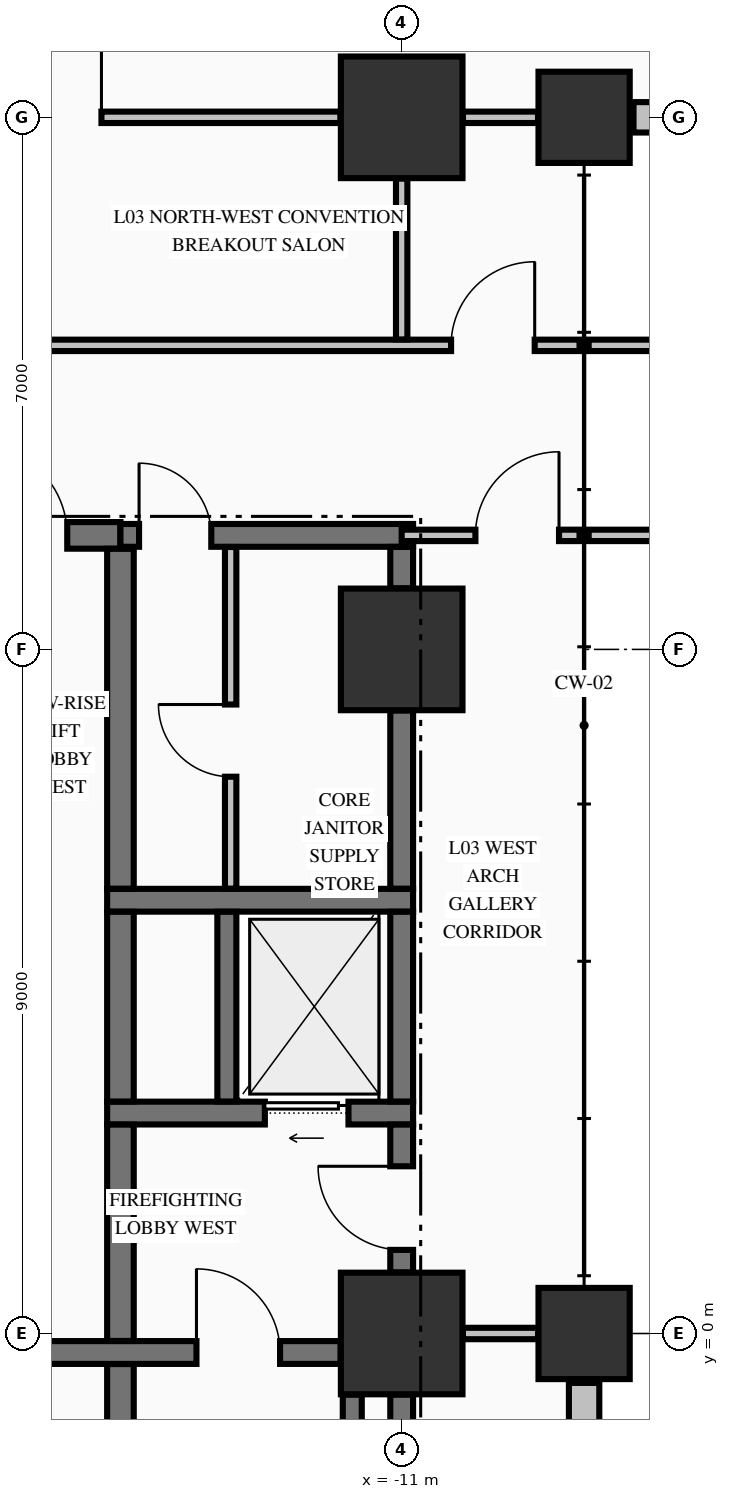
"""IFC4 building model, lengths in metres.
Left out: names, types, materials, properties, quantities, classifications, styles, units other than length and angle.
Written with IfcOpenShell. Run it as: python <this file> out.ifc"""

import sys

from ifc_helpers import new_model, si_unit, direction, frame, frame_2d, origin, origin_2d, place, context, subcontext, project, spatial, rectangle, extrude, element, fill, save


model = new_model("IFC4")
c1 = context("Model", 3, precision=1e-05, world=origin(), true_north=direction((0.0, 1.0)))
c2 = subcontext(c1, "Body", "Model", "MODEL_VIEW")
j1 = project(units=[si_unit("LENGTHUNIT", "METRE"), si_unit("PLANEANGLEUNIT", "RADIAN")], contexts=[c1])
p1 = place(None, origin())
s1 = spatial("IfcSite", under=j1, at=p1, CompositionType="ELEMENT")
p2 = place(p1, origin())
s2 = spatial("IfcBuilding", under=s1, at=p2, CompositionType="ELEMENT")
p3 = place(p2, frame((0.0, 0.0, 16.32)))
s3 = spatial("IfcBuildingStorey", under=s2, at=p3, CompositionType="ELEMENT", Elevation=16.32)
for number, where, z_axis, x_axis in (
    (1, (-11.0, 0.0, 0.0), (0.0, 0.0, 1.0), (1.0, 0.0, 0.0)),
    (2, (-11.0, 9.0, 0.0), (0.0, 0.0, 1.0), (1.0, 0.0, 0.0)),
    (3, (-11.0, 16.0, 0.0), (0.0, 0.0, 1.0), (1.0, 0.0, 0.0)),
):
    element("IfcColumn", number, at=place(p3, frame(where, z_axis=z_axis, x_axis=x_axis)), inside=s3, PredefinedType="COLUMN", context=c2, shape_type="SweptSolid", body=[
        extrude(rectangle(XDim=1.6, YDim=1.6, at=origin_2d()), origin(), (0.0, 0.0, 1.0), 4.99),
    ])
for number, where, z_axis, x_axis in (
    (4, (-8.6, 0.0, 0.0), (0.0, 0.0, 1.0), (1.0, 0.0, 0.0)),
    (5, (-8.6, 16.0, 0.0), (0.0, 0.0, 1.0), (1.0, 0.0, 0.0)),
):
    element("IfcColumn", number, at=place(p3, frame(where, z_axis=z_axis, x_axis=x_axis)), inside=s3, PredefinedType="COLUMN", context=c2, shape_type="SweptSolid", body=[
        extrude(rectangle(XDim=1.2, YDim=1.2, at=origin_2d()), origin(), (0.0, 0.0, 1.0), 4.99),
    ])
p4 = place(p3, frame((-8.6, -25.37, 0.0), z_axis=(0.0, 0.0, 1.0), x_axis=(0.0, 1.0, 0.0)))
e6 = element("IfcWall", 6, at=p4, inside=s3, PredefinedType="STANDARD", context=c2, shape_type="SweptSolid", body=[
    extrude(rectangle(XDim=24.72, YDim=0.4, at=frame_2d((12.36, 0.0))), origin(), (0.0, 0.0, 1.0), 2.582),
])
p5 = place(p3, frame((-7.95, 16.0, 0.0), z_axis=(0.0, 0.0, 1.0), x_axis=(1.0, 0.0, 0.0)))
e7 = element("IfcWall", 7, at=p5, inside=s3, PredefinedType="STANDARD", context=c2, shape_type="SweptSolid", body=[
    extrude(rectangle(XDim=7.22, YDim=0.4, at=frame_2d((3.61, 0.0))), origin(), (0.0, 0.0, 1.0), 3.332),
])
p6 = place(p3, frame((-19.196, -0.25, 0.0), z_axis=(0.0, 0.0, 1.0), x_axis=(1.0, 0.0, 0.0)))
e8 = element("IfcWall", 8, at=p6, inside=s3, PredefinedType="SHEAR", context=c2, shape_type="SweptSolid", body=[
    extrude(rectangle(XDim=7.392, YDim=0.3, at=frame_2d((3.696, 0.0))), origin(), (0.0, 0.0, 1.0), 4.99),
])
p7 = place(p6, frame((5.496, 0.0, 0.0)))
e9 = element("IfcOpeningElement", 9, at=p7, cuts=e8, PredefinedType="OPENING", context=c2, shape_type="SweptSolid", body=[
    extrude(rectangle(XDim=1.1, YDim=2.15, at=frame_2d((0.55, 1.075))), frame((0.0, 0.16, 0.0), z_axis=(0.0, -1.0, 0.0), x_axis=(1.0, 0.0, 0.0)), (0.0, 0.0, 1.0), 0.32),
])
p8 = place(p3, frame((-14.875, 2.9, 0.0), z_axis=(0.0, 0.0, 1.0), x_axis=(1.0, 0.0, 0.0)))
e10 = element("IfcWall", 10, at=p8, inside=s3, PredefinedType="SHEAR", context=c2, shape_type="SweptSolid", body=[
    extrude(rectangle(XDim=4.025, YDim=0.3, at=frame_2d((2.012, 0.0))), origin(), (0.0, 0.0, 1.0), 4.99),
])
p9 = place(p8, frame((2.075, 0.0, 0.0)))
e11 = element("IfcOpeningElement", 11, at=p9, cuts=e10, PredefinedType="OPENING", context=c2, shape_type="SweptSolid", body=[
    extrude(rectangle(XDim=1.1, YDim=2.2, at=frame_2d((0.55, 1.1))), frame((0.0, 0.16, 0.0), z_axis=(0.0, -1.0, 0.0), x_axis=(1.0, 0.0, 0.0)), (0.0, 0.0, 1.0), 0.32),
])
p10 = place(p3, frame((-14.875, 5.7, 0.0), z_axis=(0.0, 0.0, 1.0), x_axis=(1.0, 0.0, 0.0)))
e12 = element("IfcWall", 12, at=p10, inside=s3, PredefinedType="SHEAR", context=c2, shape_type="SweptSolid", body=[
    extrude(rectangle(XDim=4.025, YDim=0.3, at=frame_2d((2.012, 0.0))), origin(), (0.0, 0.0, 1.0), 4.99),
])
p11 = place(p3, frame((-20.175, 10.5, 0.0), z_axis=(0.0, 0.0, 1.0), x_axis=(1.0, 0.0, 0.0)))
e13 = element("IfcWall", 13, at=p11, inside=s3, PredefinedType="SHEAR", context=c2, shape_type="SweptSolid", body=[
    extrude(rectangle(XDim=5.475, YDim=0.35, at=frame_2d((2.738, 0.0))), origin(), (0.0, 0.0, 1.0), 4.99),
])
p12 = place(p11, frame((3.575, 0.0, 0.0)))
e14 = element("IfcOpeningElement", 14, at=p12, cuts=e13, PredefinedType="OPENING", context=c2, shape_type="SweptSolid", body=[
    extrude(rectangle(XDim=1.2, YDim=2.15, at=frame_2d((0.6, 1.075))), frame((0.0, 0.185, 0.0), z_axis=(0.0, -1.0, 0.0), x_axis=(1.0, 0.0, 0.0)), (0.0, 0.0, 1.0), 0.37),
])
p13 = place(p3, frame((-14.7, 10.5, 0.0), z_axis=(0.0, 0.0, 1.0), x_axis=(1.0, 0.0, 0.0)))
e15 = element("IfcWall", 15, at=p13, inside=s3, PredefinedType="SHEAR", context=c2, shape_type="SweptSolid", body=[
    extrude(rectangle(XDim=3.85, YDim=0.3, at=frame_2d((1.925, 0.0))), origin(), (0.0, 0.0, 1.0), 4.99),
])
p14 = place(p13, frame((0.245, 0.0, 0.0)))
e16 = element("IfcOpeningElement", 16, at=p14, cuts=e15, PredefinedType="OPENING", context=c2, shape_type="SweptSolid", body=[
    extrude(rectangle(XDim=0.95, YDim=2.15, at=frame_2d((0.475, 1.075))), frame((0.0, 0.16, 0.0), z_axis=(0.0, -1.0, 0.0), x_axis=(1.0, 0.0, 0.0)), (0.0, 0.0, 1.0), 0.32),
])
p15 = place(p3, frame((-10.194, 0.0, 0.0), z_axis=(0.0, 0.0, 1.0), x_axis=(1.0, 0.0, 0.0)))
e17 = element("IfcWall", 17, at=p15, inside=s3, PredefinedType="PARTITIONING", context=c2, shape_type="SweptSolid", body=[
    extrude(rectangle(XDim=0.988, YDim=0.15, at=frame_2d((0.494, 0.0))), origin(), (0.0, 0.0, 1.0), 3.332),
])
p16 = place(p3, frame((-11.0, 10.5, 0.0), z_axis=(0.0, 0.0, 1.0), x_axis=(1.0, 0.0, 0.0)))
e18 = element("IfcWall", 18, at=p16, inside=s3, PredefinedType="PARTITIONING", context=c2, shape_type="SweptSolid", body=[
    extrude(rectangle(XDim=2.34, YDim=0.15, at=frame_2d((1.17, 0.0))), origin(), (0.0, 0.0, 1.0), 4.99),
])
p17 = place(p16, frame((0.97, 0.0, 0.0)))
e19 = element("IfcOpeningElement", 19, at=p17, cuts=e18, PredefinedType="OPENING", context=c2, shape_type="SweptSolid", body=[
    extrude(rectangle(XDim=1.1, YDim=2.15, at=frame_2d((0.55, 1.075))), frame((0.0, 0.085, 0.0), z_axis=(0.0, -1.0, 0.0), x_axis=(1.0, 0.0, 0.0)), (0.0, 0.0, 1.0), 0.17),
])
p18 = place(p3, frame((-8.54, 10.5, 0.0), z_axis=(0.0, 0.0, 1.0), x_axis=(1.0, 0.0, 0.0)))
e20 = element("IfcWall", 20, at=p18, inside=s3, PredefinedType="PARTITIONING", context=c2, shape_type="SweptSolid", body=[
    extrude(rectangle(XDim=17.08, YDim=0.15, at=frame_2d((8.54, 0.0))), origin(), (0.0, 0.0, 1.0), 4.99),
])
p19 = place(p3, frame((-20.075, 13.0, 0.0), z_axis=(0.0, 0.0, 1.0), x_axis=(1.0, 0.0, 0.0)))
e21 = element("IfcWall", 21, at=p19, inside=s3, PredefinedType="PARTITIONING", context=c2, shape_type="SweptSolid", body=[
    extrude(rectangle(XDim=11.415, YDim=0.15, at=frame_2d((5.708, 0.0))), origin(), (0.0, 0.0, 1.0), 4.99),
])
p20 = place(p19, frame((9.725, 0.0, 0.0)))
e22 = element("IfcOpeningElement", 22, at=p20, cuts=e21, PredefinedType="OPENING", context=c2, shape_type="SweptSolid", body=[
    extrude(rectangle(XDim=1.1, YDim=2.15, at=frame_2d((0.55, 1.075))), frame((0.0, 0.085, 0.0), z_axis=(0.0, -1.0, 0.0), x_axis=(1.0, 0.0, 0.0)), (0.0, 0.0, 1.0), 0.17),
])
p21 = place(p3, frame((-8.54, 13.0, 0.0), z_axis=(0.0, 0.0, 1.0), x_axis=(1.0, 0.0, 0.0)))
e23 = element("IfcWall", 23, at=p21, inside=s3, PredefinedType="PARTITIONING", context=c2, shape_type="SweptSolid", body=[
    extrude(rectangle(XDim=17.08, YDim=0.15, at=frame_2d((8.54, 0.0))), origin(), (0.0, 0.0, 1.0), 4.99),
])
p22 = place(p3, frame((-19.194, 16.0, 0.0), z_axis=(0.0, 0.0, 1.0), x_axis=(1.0, 0.0, 0.0)))
e24 = element("IfcWall", 24, at=p22, inside=s3, PredefinedType="PARTITIONING", context=c2, shape_type="SweptSolid", body=[
    extrude(rectangle(XDim=7.388, YDim=0.15, at=frame_2d((3.694, 0.0))), origin(), (0.0, 0.0, 1.0), 3.332),
])
p23 = place(p22, frame((3.144, 0.0, 0.0)))
e25 = element("IfcOpeningElement", 25, at=p23, cuts=e24, PredefinedType="OPENING", context=c2, shape_type="SweptSolid", body=[
    extrude(rectangle(XDim=1.1, YDim=2.15, at=frame_2d((0.55, 1.075))), frame((0.0, 0.085, 0.0), z_axis=(0.0, -1.0, 0.0), x_axis=(1.0, 0.0, 0.0)), (0.0, 0.0, 1.0), 0.17),
])
p24 = place(p3, frame((-10.194, 16.0, 0.0), z_axis=(0.0, 0.0, 1.0), x_axis=(1.0, 0.0, 0.0)))
e26 = element("IfcWall", 26, at=p24, inside=s3, PredefinedType="PARTITIONING", context=c2, shape_type="SweptSolid", body=[
    extrude(rectangle(XDim=0.988, YDim=0.15, at=frame_2d((0.494, 0.0))), origin(), (0.0, 0.0, 1.0), 3.332),
])
p25 = place(p3, frame((-14.7, -9.773, 0.0), z_axis=(0.0, 0.0, 1.0), x_axis=(0.0, 1.0, 0.0)))
e27 = element("IfcWall", 27, at=p25, inside=s3, PredefinedType="SHEAR", context=c2, shape_type="SweptSolid", body=[
    extrude(rectangle(XDim=9.371, YDim=0.35, at=frame_2d((4.686, 0.0))), origin(), (0.0, 0.0, 1.0), 4.99),
])
p26 = place(p3, frame((-14.7, -0.098, 0.0), z_axis=(0.0, 0.0, 1.0), x_axis=(0.0, 1.0, 0.0)))
e28 = element("IfcWall", 28, at=p26, inside=s3, PredefinedType="SHEAR", context=c2, shape_type="SweptSolid", body=[
    extrude(rectangle(XDim=2.846, YDim=0.35, at=frame_2d((1.423, 0.0))), origin(), (0.0, 0.0, 1.0), 4.99),
])
p27 = place(p3, frame((-14.7, 3.052, 0.0), z_axis=(0.0, 0.0, 1.0), x_axis=(0.0, 1.0, 0.0)))
e29 = element("IfcWall", 29, at=p27, inside=s3, PredefinedType="SHEAR", context=c2, shape_type="SweptSolid", body=[
    extrude(rectangle(XDim=2.496, YDim=0.35, at=frame_2d((1.248, 0.0))), origin(), (0.0, 0.0, 1.0), 4.99),
])
p28 = place(p3, frame((-14.7, 5.852, 0.0), z_axis=(0.0, 0.0, 1.0), x_axis=(0.0, 1.0, 0.0)))
e30 = element("IfcWall", 30, at=p28, inside=s3, PredefinedType="SHEAR", context=c2, shape_type="SweptSolid", body=[
    extrude(rectangle(XDim=4.471, YDim=0.35, at=frame_2d((2.235, 0.0))), origin(), (0.0, 0.0, 1.0), 4.99),
])
p29 = place(p3, frame((-13.3, 3.052, 0.0), z_axis=(0.0, 0.0, 1.0), x_axis=(0.0, 1.0, 0.0)))
e31 = element("IfcWall", 31, at=p29, inside=s3, PredefinedType="SOLIDWALL", context=c2, shape_type="SweptSolid", body=[
    extrude(rectangle(XDim=2.496, YDim=0.25, at=frame_2d((1.248, 0.0))), origin(), (0.0, 0.0, 1.0), 4.99),
])
p30 = place(p3, frame((-11.65, -8.196, 0.0), z_axis=(0.0, 0.0, 1.0), x_axis=(0.0, 1.0, 0.0)))
e32 = element("IfcWall", 32, at=p30, inside=s3, PredefinedType="SOLIDWALL", context=c2, shape_type="SweptSolid", body=[
    extrude(rectangle(XDim=7.392, YDim=0.25, at=frame_2d((3.696, 0.0))), origin(), (0.0, 0.0, 1.0), 4.99),
])
p31 = place(p3, frame((-11.0, -8.196, 0.0), z_axis=(0.0, 0.0, 1.0), x_axis=(0.0, 1.0, 0.0)))
e33 = element("IfcWall", 33, at=p31, inside=s3, PredefinedType="SHEAR", context=c2, shape_type="SweptSolid", body=[
    extrude(rectangle(XDim=7.392, YDim=0.3, at=frame_2d((3.696, 0.0))), origin(), (0.0, 0.0, 1.0), 4.99),
])
p32 = place(p3, frame((-11.0, 0.804, 0.0), z_axis=(0.0, 0.0, 1.0), x_axis=(0.0, 1.0, 0.0)))
e34 = element("IfcWall", 34, at=p32, inside=s3, PredefinedType="SHEAR", context=c2, shape_type="SweptSolid", body=[
    extrude(rectangle(XDim=1.944, YDim=0.3, at=frame_2d((0.972, 0.0))), origin(), (0.0, 0.0, 1.0), 4.99),
])
p33 = place(p32, frame((0.296, 0.0, 0.0)))
e35 = element("IfcOpeningElement", 35, at=p33, cuts=e34, PredefinedType="OPENING", context=c2, shape_type="SweptSolid", body=[
    extrude(rectangle(XDim=1.1, YDim=2.15, at=frame_2d((0.55, 1.075))), frame((0.0, 0.16, 0.0), z_axis=(0.0, -1.0, 0.0), x_axis=(1.0, 0.0, 0.0)), (0.0, 0.0, 1.0), 0.32),
])
p34 = place(p3, frame((-11.0, 3.052, 0.0), z_axis=(0.0, 0.0, 1.0), x_axis=(0.0, 1.0, 0.0)))
e36 = element("IfcWall", 36, at=p34, inside=s3, PredefinedType="SHEAR", context=c2, shape_type="SweptSolid", body=[
    extrude(rectangle(XDim=2.496, YDim=0.3, at=frame_2d((1.248, 0.0))), origin(), (0.0, 0.0, 1.0), 4.99),
])
p35 = place(p3, frame((-11.0, 5.852, 0.0), z_axis=(0.0, 0.0, 1.0), x_axis=(0.0, 1.0, 0.0)))
e37 = element("IfcWall", 37, at=p35, inside=s3, PredefinedType="SHEAR", context=c2, shape_type="SweptSolid", body=[
    extrude(rectangle(XDim=2.344, YDim=0.3, at=frame_2d((1.172, 0.0))), origin(), (0.0, 0.0, 1.0), 4.99),
])
p36 = place(p3, frame((-11.0, 9.804, 0.0), z_axis=(0.0, 0.0, 1.0), x_axis=(0.0, 1.0, 0.0)))
e38 = element("IfcWall", 38, at=p36, inside=s3, PredefinedType="SHEAR", context=c2, shape_type="SweptSolid", body=[
    extrude(rectangle(XDim=0.544, YDim=0.3, at=frame_2d((0.272, 0.0))), origin(), (0.0, 0.0, 1.0), 4.99),
])
p37 = place(p3, frame((-13.25, 5.853, 0.0), z_axis=(0.0, 0.0, 1.0), x_axis=(0.0, 1.0, 0.0)))
e39 = element("IfcWall", 39, at=p37, inside=s3, PredefinedType="PARTITIONING", context=c2, shape_type="SweptSolid", body=[
    extrude(rectangle(XDim=4.494, YDim=0.15, at=frame_2d((2.247, 0.0))), origin(), (0.0, 0.0, 1.0), 4.99),
])
p38 = place(p37, frame((1.472, 0.0, 0.0)))
e40 = element("IfcOpeningElement", 40, at=p38, cuts=e39, PredefinedType="OPENING", context=c2, shape_type="SweptSolid", body=[
    extrude(rectangle(XDim=0.95, YDim=2.15, at=frame_2d((0.475, 1.075))), frame((0.0, 0.085, 0.0), z_axis=(0.0, -1.0, 0.0), x_axis=(1.0, 0.0, 0.0)), (0.0, 0.0, 1.0), 0.17),
])
p39 = place(p3, frame((-11.0, 13.078, 0.0), z_axis=(0.0, 0.0, 1.0), x_axis=(0.0, 1.0, 0.0)))
e41 = element("IfcWall", 41, at=p39, inside=s3, PredefinedType="PARTITIONING", context=c2, shape_type="SweptSolid", body=[
    extrude(rectangle(XDim=2.116, YDim=0.15, at=frame_2d((1.058, 0.0))), origin(), (0.0, 0.0, 1.0), 3.332),
])
p40 = place(p7, origin())
e42 = element("IfcDoor", 42, at=p40, inside=s3, OperationType="SINGLE_SWING_LEFT", PredefinedType="DOOR", context=c2, shape_type="SweptSolid", body=[
    extrude(rectangle(XDim=1.1, YDim=2.15, at=frame_2d((0.55, 1.075))), frame((0.0, 0.025, 0.0), z_axis=(0.0, -1.0, 0.0), x_axis=(1.0, 0.0, 0.0)), (0.0, 0.0, 1.0), 0.05),
])
fill(e9, e42)
p41 = place(p33, origin())
e43 = element("IfcDoor", 43, at=p41, inside=s3, OperationType="SINGLE_SWING_RIGHT", PredefinedType="DOOR", context=c2, shape_type="SweptSolid", body=[
    extrude(rectangle(XDim=1.1, YDim=2.15, at=frame_2d((0.55, 1.075))), frame((0.0, 0.025, 0.0), z_axis=(0.0, -1.0, 0.0), x_axis=(1.0, 0.0, 0.0)), (0.0, 0.0, 1.0), 0.05),
])
fill(e35, e43)
p42 = place(p9, origin())
e44 = element("IfcDoor", 44, at=p42, inside=s3, OperationType="SLIDING_TO_LEFT", PredefinedType="DOOR", context=c2, shape_type="SweptSolid", body=[
    extrude(rectangle(XDim=1.1, YDim=2.2, at=frame_2d((0.55, 1.1))), frame((0.0, 0.025, 0.0), z_axis=(0.0, -1.0, 0.0), x_axis=(1.0, 0.0, 0.0)), (0.0, 0.0, 1.0), 0.05),
])
fill(e11, e44)
p43 = place(p14, origin())
e45 = element("IfcDoor", 45, at=p43, inside=s3, OperationType="SINGLE_SWING_LEFT", PredefinedType="DOOR", context=c2, shape_type="SweptSolid", body=[
    extrude(rectangle(XDim=0.95, YDim=2.15, at=frame_2d((0.475, 1.075))), frame((0.0, 0.025, 0.0), z_axis=(0.0, -1.0, 0.0), x_axis=(1.0, 0.0, 0.0)), (0.0, 0.0, 1.0), 0.05),
])
fill(e16, e45)
p44 = place(p38, origin())
e46 = element("IfcDoor", 46, at=p44, inside=s3, OperationType="SINGLE_SWING_RIGHT", PredefinedType="DOOR", context=c2, shape_type="SweptSolid", body=[
    extrude(rectangle(XDim=0.95, YDim=2.15, at=frame_2d((0.475, 1.075))), frame((0.0, 0.025, 0.0), z_axis=(0.0, -1.0, 0.0), x_axis=(1.0, 0.0, 0.0)), (0.0, 0.0, 1.0), 0.05),
])
fill(e40, e46)
p45 = place(p12, origin())
e47 = element("IfcDoor", 47, at=p45, inside=s3, OperationType="SINGLE_SWING_LEFT", PredefinedType="DOOR", context=c2, shape_type="SweptSolid", body=[
    extrude(rectangle(XDim=1.2, YDim=2.15, at=frame_2d((0.6, 1.075))), frame((0.0, 0.025, 0.0), z_axis=(0.0, -1.0, 0.0), x_axis=(1.0, 0.0, 0.0)), (0.0, 0.0, 1.0), 0.05),
])
fill(e14, e47)
p46 = place(p23, origin())
e48 = element("IfcDoor", 48, at=p46, inside=s3, OperationType="SINGLE_SWING_RIGHT", PredefinedType="DOOR", context=c2, shape_type="SweptSolid", body=[
    extrude(rectangle(XDim=1.1, YDim=2.15, at=frame_2d((0.55, 1.075))), frame((0.0, 0.025, 0.0), z_axis=(0.0, -1.0, 0.0), x_axis=(1.0, 0.0, 0.0)), (0.0, 0.0, 1.0), 0.05),
])
fill(e25, e48)
p47 = place(p20, origin())
e49 = element("IfcDoor", 49, at=p47, inside=s3, OperationType="SINGLE_SWING_RIGHT", PredefinedType="DOOR", context=c2, shape_type="SweptSolid", body=[
    extrude(rectangle(XDim=1.1, YDim=2.15, at=frame_2d((0.55, 1.075))), frame((0.0, 0.025, 0.0), z_axis=(0.0, -1.0, 0.0), x_axis=(1.0, 0.0, 0.0)), (0.0, 0.0, 1.0), 0.05),
])
fill(e22, e49)
p48 = place(p17, origin())
e50 = element("IfcDoor", 50, at=p48, inside=s3, OperationType="SINGLE_SWING_RIGHT", PredefinedType="DOOR", context=c2, shape_type="SweptSolid", body=[
    extrude(rectangle(XDim=1.1, YDim=2.15, at=frame_2d((0.55, 1.075))), frame((0.0, 0.025, 0.0), z_axis=(0.0, -1.0, 0.0), x_axis=(1.0, 0.0, 0.0)), (0.0, 0.0, 1.0), 0.05),
])
fill(e19, e50)
save(model, sys.argv[1])
